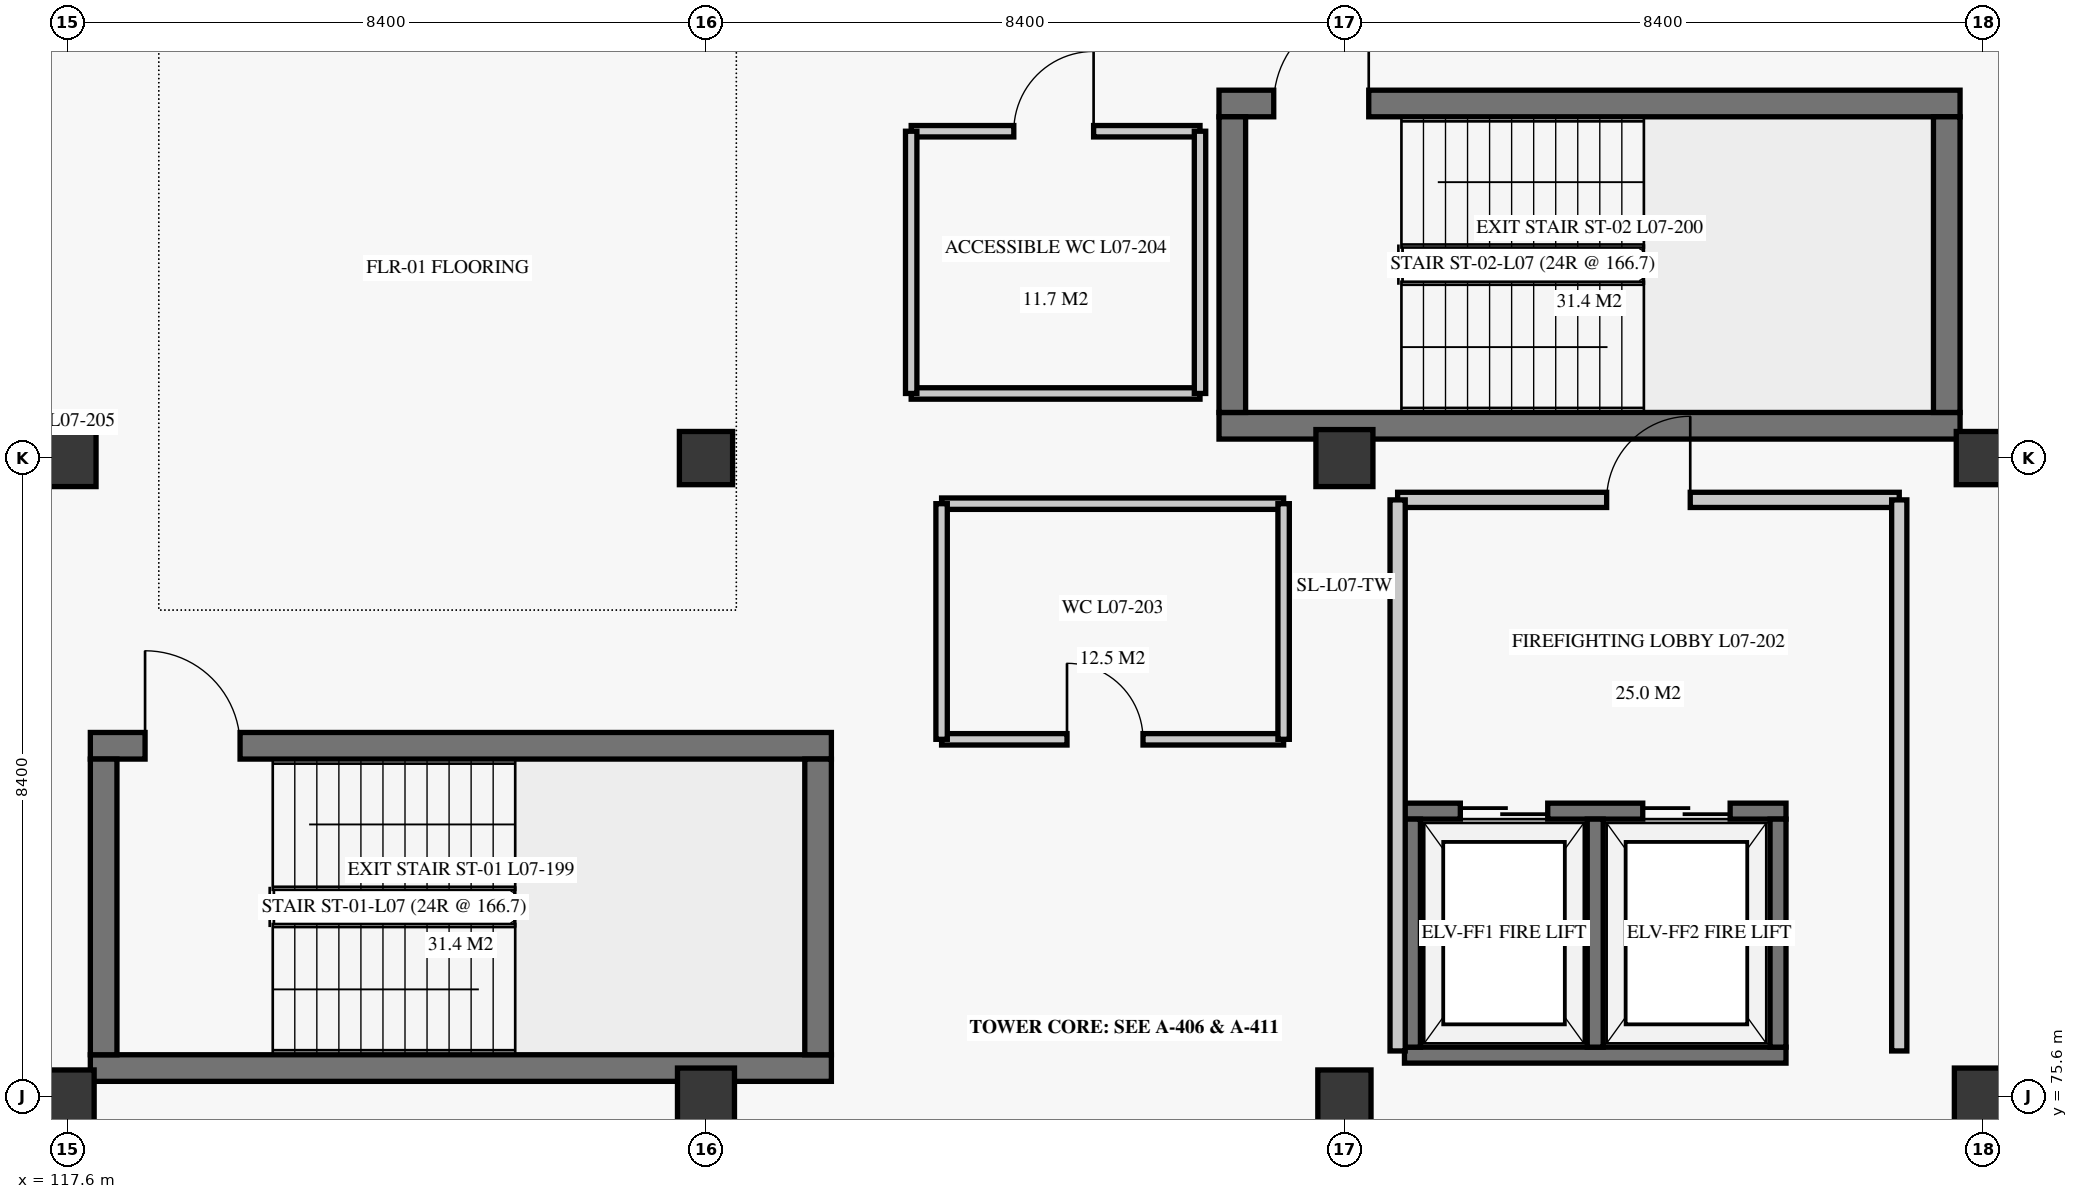
"""IFC4 building model, lengths in metres.
Left out: names, types, materials, properties, quantities, classifications, styles, units other than length and angle.
Written with IfcOpenShell. Run it as: python <this file> out.ifc"""

import sys

from ifc_helpers import new_model, si_unit, direction, frame, frame_2d, origin, origin_2d, place, context, subcontext, project, spatial, rectangle, extrude, element, fill, save


model = new_model("IFC4")
c1 = context("Model", 3, precision=1e-05, world=origin(), true_north=direction((0.0, 1.0)))
c2 = subcontext(c1, "Body", "Model", "MODEL_VIEW")
j1 = project(units=[si_unit("LENGTHUNIT", "METRE"), si_unit("PLANEANGLEUNIT", "RADIAN")], contexts=[c1])
p1 = place(None, origin())
s1 = spatial("IfcSite", under=j1, at=p1, CompositionType="ELEMENT")
p2 = place(p1, origin())
s2 = spatial("IfcBuilding", under=s1, at=p2, CompositionType="ELEMENT")
p3 = place(p2, frame((0.0, 0.0, 30.7)))
s3 = spatial("IfcBuildingStorey", under=s2, at=p3, CompositionType="ELEMENT", Elevation=30.7)
p4 = place(p3, frame((117.6, 75.6, 0.0), z_axis=(0.0, 0.0, 1.0), x_axis=(1.0, 0.0, 0.0)))
e1 = element("IfcColumn", 1, at=p4, inside=s3, PredefinedType="COLUMN", context=c2, shape_type="SweptSolid", body=[
    extrude(rectangle(XDim=0.7, YDim=0.7, at=origin_2d()), origin(), (0.0, 0.0, 1.0), 3.72),
])
for number, where, z_axis, x_axis in (
    (2, (117.6, 84.0, 0.0), (0.0, 0.0, 1.0), (1.0, 0.0, 0.0)),
    (3, (126.0, 75.6, 0.0), (0.0, 0.0, 1.0), (1.0, 0.0, 0.0)),
):
    element("IfcColumn", number, at=place(p3, frame(where, z_axis=z_axis, x_axis=x_axis)), inside=s3, PredefinedType="COLUMN", context=c2, shape_type="SweptSolid", body=[
        extrude(rectangle(XDim=0.75, YDim=0.75, at=origin_2d()), origin(), (0.0, 0.0, 1.0), 3.72),
    ])
for number, where, z_axis, x_axis in (
    (4, (126.0, 84.0, 0.0), (0.0, 0.0, 1.0), (1.0, 0.0, 0.0)),
    (5, (134.4, 75.6, 0.0), (0.0, 0.0, 1.0), (1.0, 0.0, 0.0)),
):
    element("IfcColumn", number, at=place(p3, frame(where, z_axis=z_axis, x_axis=x_axis)), inside=s3, PredefinedType="COLUMN", context=c2, shape_type="SweptSolid", body=[
        extrude(rectangle(XDim=0.7, YDim=0.7, at=origin_2d()), origin(), (0.0, 0.0, 1.0), 3.72),
    ])
for number, where, z_axis, x_axis in (
    (6, (134.4, 84.0, 0.0), (0.0, 0.0, 1.0), (1.0, 0.0, 0.0)),
    (7, (142.8, 75.6, 0.0), (0.0, 0.0, 1.0), (1.0, 0.0, 0.0)),
):
    element("IfcColumn", number, at=place(p3, frame(where, z_axis=z_axis, x_axis=x_axis)), inside=s3, PredefinedType="COLUMN", context=c2, shape_type="SweptSolid", body=[
        extrude(rectangle(XDim=0.75, YDim=0.75, at=origin_2d()), origin(), (0.0, 0.0, 1.0), 3.72),
    ])
p5 = place(p3, frame((142.8, 84.0, 0.0), z_axis=(0.0, 0.0, 1.0), x_axis=(1.0, 0.0, 0.0)))
e8 = element("IfcColumn", 8, at=p5, inside=s3, PredefinedType="COLUMN", context=c2, shape_type="SweptSolid", body=[
    extrude(rectangle(XDim=0.7, YDim=0.7, at=origin_2d()), origin(), (0.0, 0.0, 1.0), 3.72),
])
p6 = place(p3, frame((117.9, 75.975, 0.0), z_axis=(0.0, 0.0, 1.0), x_axis=(1.0, 0.0, 0.0)))
e9 = element("IfcWall", 9, at=p6, inside=s3, PredefinedType="SHEAR", context=c2, shape_type="SweptSolid", body=[
    extrude(rectangle(XDim=9.75, YDim=0.35, at=frame_2d((4.875, 0.0))), origin(), (0.0, 0.0, 1.0), 3.72),
])
p7 = place(p3, frame((117.9, 80.215, 0.0), z_axis=(0.0, 0.0, 1.0), x_axis=(1.0, 0.0, 0.0)))
e10 = element("IfcWall", 10, at=p7, inside=s3, PredefinedType="SHEAR", context=c2, shape_type="SweptSolid", body=[
    extrude(rectangle(XDim=9.75, YDim=0.35, at=frame_2d((4.875, 0.0))), origin(), (0.0, 0.0, 1.0), 3.72),
])
p8 = place(p7, frame((0.72, 0.0, 0.0)))
e11 = element("IfcOpeningElement", 11, at=p8, cuts=e10, PredefinedType="OPENING", context=c2, shape_type="SweptSolid", body=[
    extrude(rectangle(XDim=1.25, YDim=2.2, at=frame_2d((0.625, 1.1))), frame((0.0, 0.185, 0.0), z_axis=(0.0, -1.0, 0.0), x_axis=(1.0, 0.0, 0.0)), (0.0, 0.0, 1.0), 0.37),
])
for number, where, z_axis, x_axis in (
    (12, (118.075, 76.15, 0.0), (0.0, 0.0, 1.0), (0.0, 1.0, 0.0)),
    (13, (127.475, 76.15, 0.0), (0.0, 0.0, 1.0), (0.0, 1.0, 0.0)),
):
    element("IfcWall", number, at=place(p3, frame(where, z_axis=z_axis, x_axis=x_axis)), inside=s3, PredefinedType="SHEAR", context=c2, shape_type="SweptSolid", body=[
        extrude(rectangle(XDim=3.89, YDim=0.35, at=frame_2d((1.945, 0.0))), origin(), (0.0, 0.0, 1.0), 3.72),
    ])
p9 = place(p3, frame((132.75, 84.425, 0.0), z_axis=(0.0, 0.0, 1.0), x_axis=(1.0, 0.0, 0.0)))
e14 = element("IfcWall", 14, at=p9, inside=s3, PredefinedType="SHEAR", context=c2, shape_type="SweptSolid", body=[
    extrude(rectangle(XDim=9.75, YDim=0.35, at=frame_2d((4.875, 0.0))), origin(), (0.0, 0.0, 1.0), 3.72),
])
p10 = place(p3, frame((132.75, 88.665, 0.0), z_axis=(0.0, 0.0, 1.0), x_axis=(1.0, 0.0, 0.0)))
e15 = element("IfcWall", 15, at=p10, inside=s3, PredefinedType="SHEAR", context=c2, shape_type="SweptSolid", body=[
    extrude(rectangle(XDim=9.75, YDim=0.35, at=frame_2d((4.875, 0.0))), origin(), (0.0, 0.0, 1.0), 3.72),
])
p11 = place(p10, frame((0.72, 0.0, 0.0)))
e16 = element("IfcOpeningElement", 16, at=p11, cuts=e15, PredefinedType="OPENING", context=c2, shape_type="SweptSolid", body=[
    extrude(rectangle(XDim=1.25, YDim=2.2, at=frame_2d((0.625, 1.1))), frame((0.0, 0.185, 0.0), z_axis=(0.0, -1.0, 0.0), x_axis=(1.0, 0.0, 0.0)), (0.0, 0.0, 1.0), 0.37),
])
for number, where, z_axis, x_axis in (
    (17, (132.925, 84.6, 0.0), (0.0, 0.0, 1.0), (0.0, 1.0, 0.0)),
    (18, (142.325, 84.6, 0.0), (0.0, 0.0, 1.0), (0.0, 1.0, 0.0)),
):
    element("IfcWall", number, at=place(p3, frame(where, z_axis=z_axis, x_axis=x_axis)), inside=s3, PredefinedType="SHEAR", context=c2, shape_type="SweptSolid", body=[
        extrude(rectangle(XDim=3.89, YDim=0.35, at=frame_2d((1.945, 0.0))), origin(), (0.0, 0.0, 1.0), 3.72),
    ])
p12 = place(p3, frame((135.19, 76.145, 0.0), z_axis=(0.0, 0.0, 1.0), x_axis=(1.0, 0.0, 0.0)))
e19 = element("IfcWall", 19, at=p12, inside=s3, PredefinedType="SHEAR", context=c2, shape_type="SweptSolid", body=[
    extrude(rectangle(XDim=5.02, YDim=0.21, at=frame_2d((2.51, 0.0))), origin(), (0.0, 0.0, 1.0), 3.72),
])
p13 = place(p3, frame((135.19, 79.355, 0.0), z_axis=(0.0, 0.0, 1.0), x_axis=(1.0, 0.0, 0.0)))
e20 = element("IfcWall", 20, at=p13, inside=s3, PredefinedType="SHEAR", context=c2, shape_type="SweptSolid", body=[
    extrude(rectangle(XDim=5.02, YDim=0.21, at=frame_2d((2.51, 0.0))), origin(), (0.0, 0.0, 1.0), 3.72),
])
p14 = place(p13, frame((0.735, 0.0, 0.0)))
e21 = element("IfcOpeningElement", 21, at=p14, cuts=e20, PredefinedType="OPENING", context=c2, shape_type="SweptSolid", body=[
    extrude(rectangle(XDim=1.15, YDim=2.2, at=frame_2d((0.575, 1.1))), frame((0.0, 0.115, 0.0), z_axis=(0.0, -1.0, 0.0), x_axis=(1.0, 0.0, 0.0)), (0.0, 0.0, 1.0), 0.23),
])
p15 = place(p13, frame((3.135, 0.0, 0.0)))
e22 = element("IfcOpeningElement", 22, at=p15, cuts=e20, PredefinedType="OPENING", context=c2, shape_type="SweptSolid", body=[
    extrude(rectangle(XDim=1.15, YDim=2.2, at=frame_2d((0.575, 1.1))), frame((0.0, 0.115, 0.0), z_axis=(0.0, -1.0, 0.0), x_axis=(1.0, 0.0, 0.0)), (0.0, 0.0, 1.0), 0.23),
])
for number, where, z_axis, x_axis in (
    (23, (135.295, 76.25, 0.0), (0.0, 0.0, 1.0), (0.0, 1.0, 0.0)),
    (24, (140.105, 76.25, 0.0), (0.0, 0.0, 1.0), (0.0, 1.0, 0.0)),
    (25, (137.7, 76.25, 0.0), (0.0, 0.0, 1.0), (0.0, 1.0, 0.0)),
):
    element("IfcWall", number, at=place(p3, frame(where, z_axis=z_axis, x_axis=x_axis)), inside=s3, PredefinedType="SHEAR", context=c2, shape_type="SweptSolid", body=[
        extrude(rectangle(XDim=3.0, YDim=0.21, at=frame_2d((1.5, 0.0))), origin(), (0.0, 0.0, 1.0), 3.72),
    ])
p16 = place(p3, frame((135.1, 83.45, 0.0), z_axis=(0.0, 0.0, 1.0), x_axis=(1.0, 0.0, 0.0)))
e26 = element("IfcWall", 26, at=p16, inside=s3, PredefinedType="PARTITIONING", context=c2, shape_type="SweptSolid", body=[
    extrude(rectangle(XDim=6.6, YDim=0.2, at=frame_2d((3.3, 0.0))), origin(), (0.0, 0.0, 1.0), 3.34),
])
p17 = place(p16, frame((2.75, 0.0, 0.0)))
e27 = element("IfcOpeningElement", 27, at=p17, cuts=e26, PredefinedType="OPENING", context=c2, shape_type="SweptSolid", body=[
    extrude(rectangle(XDim=1.1, YDim=2.2, at=frame_2d((0.55, 1.1))), frame((0.0, 0.11, 0.0), z_axis=(0.0, -1.0, 0.0), x_axis=(1.0, 0.0, 0.0)), (0.0, 0.0, 1.0), 0.22),
])
for number, where, z_axis, x_axis in (
    (28, (135.1, 76.2, 0.0), (0.0, 0.0, 1.0), (0.0, 1.0, 0.0)),
    (29, (141.7, 76.2, 0.0), (0.0, 0.0, 1.0), (0.0, 1.0, 0.0)),
):
    element("IfcWall", number, at=place(p3, frame(where, z_axis=z_axis, x_axis=x_axis)), inside=s3, PredefinedType="PARTITIONING", context=c2, shape_type="SweptSolid", body=[
        extrude(rectangle(XDim=7.25, YDim=0.2, at=frame_2d((3.625, 0.0))), origin(), (0.0, 0.0, 1.0), 3.34),
    ])
p18 = place(p3, frame((129.1, 80.3, 0.0), z_axis=(0.0, 0.0, 1.0), x_axis=(1.0, 0.0, 0.0)))
e30 = element("IfcWall", 30, at=p18, inside=s3, PredefinedType="PARTITIONING", context=c2, shape_type="SweptSolid", body=[
    extrude(rectangle(XDim=4.5, YDim=0.15, at=frame_2d((2.25, 0.0))), origin(), (0.0, 0.0, 1.0), 3.34),
])
p19 = place(p18, frame((1.65, 0.0, 0.0)))
e31 = element("IfcOpeningElement", 31, at=p19, cuts=e30, PredefinedType="OPENING", context=c2, shape_type="SweptSolid", body=[
    extrude(rectangle(XDim=1.0, YDim=2.1, at=frame_2d((0.5, 1.05))), frame((0.0, 0.085, 0.0), z_axis=(0.0, -1.0, 0.0), x_axis=(1.0, 0.0, 0.0)), (0.0, 0.0, 1.0), 0.17),
])
p20 = place(p3, frame((129.1, 83.4, 0.0), z_axis=(0.0, 0.0, 1.0), x_axis=(1.0, 0.0, 0.0)))
e32 = element("IfcWall", 32, at=p20, inside=s3, PredefinedType="PARTITIONING", context=c2, shape_type="SweptSolid", body=[
    extrude(rectangle(XDim=4.5, YDim=0.15, at=frame_2d((2.25, 0.0))), origin(), (0.0, 0.0, 1.0), 3.34),
])
for number, where, z_axis, x_axis in (
    (33, (129.1, 80.3, 0.0), (0.0, 0.0, 1.0), (0.0, 1.0, 0.0)),
    (34, (133.6, 80.3, 0.0), (0.0, 0.0, 1.0), (0.0, 1.0, 0.0)),
):
    element("IfcWall", number, at=place(p3, frame(where, z_axis=z_axis, x_axis=x_axis)), inside=s3, PredefinedType="PARTITIONING", context=c2, shape_type="SweptSolid", body=[
        extrude(rectangle(XDim=3.1, YDim=0.15, at=frame_2d((1.55, 0.0))), origin(), (0.0, 0.0, 1.0), 3.34),
    ])
p21 = place(p3, frame((128.7, 88.3, 0.0), z_axis=(0.0, 0.0, 1.0), x_axis=(1.0, 0.0, 0.0)))
e35 = element("IfcWall", 35, at=p21, inside=s3, PredefinedType="PARTITIONING", context=c2, shape_type="SweptSolid", body=[
    extrude(rectangle(XDim=3.8, YDim=0.15, at=frame_2d((1.9, 0.0))), origin(), (0.0, 0.0, 1.0), 3.34),
])
p22 = place(p21, frame((1.35, 0.0, 0.0)))
e36 = element("IfcOpeningElement", 36, at=p22, cuts=e35, PredefinedType="OPENING", context=c2, shape_type="SweptSolid", body=[
    extrude(rectangle(XDim=1.05, YDim=2.15, at=frame_2d((0.525, 1.075))), frame((0.0, 0.085, 0.0), z_axis=(0.0, -1.0, 0.0), x_axis=(1.0, 0.0, 0.0)), (0.0, 0.0, 1.0), 0.17),
])
p23 = place(p3, frame((128.7, 84.85, 0.0), z_axis=(0.0, 0.0, 1.0), x_axis=(1.0, 0.0, 0.0)))
e37 = element("IfcWall", 37, at=p23, inside=s3, PredefinedType="PARTITIONING", context=c2, shape_type="SweptSolid", body=[
    extrude(rectangle(XDim=3.8, YDim=0.15, at=frame_2d((1.9, 0.0))), origin(), (0.0, 0.0, 1.0), 3.34),
])
for number, where, z_axis, x_axis in (
    (38, (128.7, 84.85, 0.0), (0.0, 0.0, 1.0), (0.0, 1.0, 0.0)),
    (39, (132.5, 84.85, 0.0), (0.0, 0.0, 1.0), (0.0, 1.0, 0.0)),
):
    element("IfcWall", number, at=place(p3, frame(where, z_axis=z_axis, x_axis=x_axis)), inside=s3, PredefinedType="PARTITIONING", context=c2, shape_type="SweptSolid", body=[
        extrude(rectangle(XDim=3.45, YDim=0.15, at=frame_2d((1.725, 0.0))), origin(), (0.0, 0.0, 1.0), 3.34),
    ])
p24 = place(p8, origin())
e40 = element("IfcDoor", 40, at=p24, inside=s3, OperationType="SINGLE_SWING_LEFT", PredefinedType="DOOR", context=c2, shape_type="SweptSolid", body=[
    extrude(rectangle(XDim=1.25, YDim=2.2, at=frame_2d((0.625, 1.1))), frame((0.0, 0.025, 0.0), z_axis=(0.0, -1.0, 0.0), x_axis=(1.0, 0.0, 0.0)), (0.0, 0.0, 1.0), 0.05),
])
fill(e11, e40)
p25 = place(p11, origin())
e41 = element("IfcDoor", 41, at=p25, inside=s3, OperationType="SINGLE_SWING_RIGHT", PredefinedType="DOOR", context=c2, shape_type="SweptSolid", body=[
    extrude(rectangle(XDim=1.25, YDim=2.2, at=frame_2d((0.625, 1.1))), frame((0.0, 0.025, 0.0), z_axis=(0.0, -1.0, 0.0), x_axis=(1.0, 0.0, 0.0)), (0.0, 0.0, 1.0), 0.05),
])
fill(e16, e41)
p26 = place(p14, origin())
e42 = element("IfcDoor", 42, at=p26, inside=s3, OperationType="DOUBLE_DOOR_SLIDING", PredefinedType="DOOR", context=c2, shape_type="SweptSolid", body=[
    extrude(rectangle(XDim=1.15, YDim=2.2, at=frame_2d((0.575, 1.1))), frame((0.0, 0.025, 0.0), z_axis=(0.0, -1.0, 0.0), x_axis=(1.0, 0.0, 0.0)), (0.0, 0.0, 1.0), 0.05),
])
fill(e21, e42)
p27 = place(p15, origin())
e43 = element("IfcDoor", 43, at=p27, inside=s3, OperationType="DOUBLE_DOOR_SLIDING", PredefinedType="DOOR", context=c2, shape_type="SweptSolid", body=[
    extrude(rectangle(XDim=1.15, YDim=2.2, at=frame_2d((0.575, 1.1))), frame((0.0, 0.025, 0.0), z_axis=(0.0, -1.0, 0.0), x_axis=(1.0, 0.0, 0.0)), (0.0, 0.0, 1.0), 0.05),
])
fill(e22, e43)
p28 = place(p17, origin())
e44 = element("IfcDoor", 44, at=p28, inside=s3, OperationType="SINGLE_SWING_RIGHT", PredefinedType="DOOR", context=c2, shape_type="SweptSolid", body=[
    extrude(rectangle(XDim=1.1, YDim=2.2, at=frame_2d((0.55, 1.1))), frame((0.0, 0.025, 0.0), z_axis=(0.0, -1.0, 0.0), x_axis=(1.0, 0.0, 0.0)), (0.0, 0.0, 1.0), 0.05),
])
fill(e27, e44)
p29 = place(p19, origin())
e45 = element("IfcDoor", 45, at=p29, inside=s3, OperationType="SINGLE_SWING_LEFT", PredefinedType="DOOR", context=c2, shape_type="SweptSolid", body=[
    extrude(rectangle(XDim=1.0, YDim=2.1, at=frame_2d((0.5, 1.05))), frame((0.0, 0.025, 0.0), z_axis=(0.0, -1.0, 0.0), x_axis=(1.0, 0.0, 0.0)), (0.0, 0.0, 1.0), 0.05),
])
fill(e31, e45)
p30 = place(p22, origin())
e46 = element("IfcDoor", 46, at=p30, inside=s3, OperationType="SINGLE_SWING_RIGHT", PredefinedType="DOOR", context=c2, shape_type="SweptSolid", body=[
    extrude(rectangle(XDim=1.05, YDim=2.15, at=frame_2d((0.525, 1.075))), frame((0.0, 0.025, 0.0), z_axis=(0.0, -1.0, 0.0), x_axis=(1.0, 0.0, 0.0)), (0.0, 0.0, 1.0), 0.05),
])
fill(e36, e46)
save(model, sys.argv[1])
